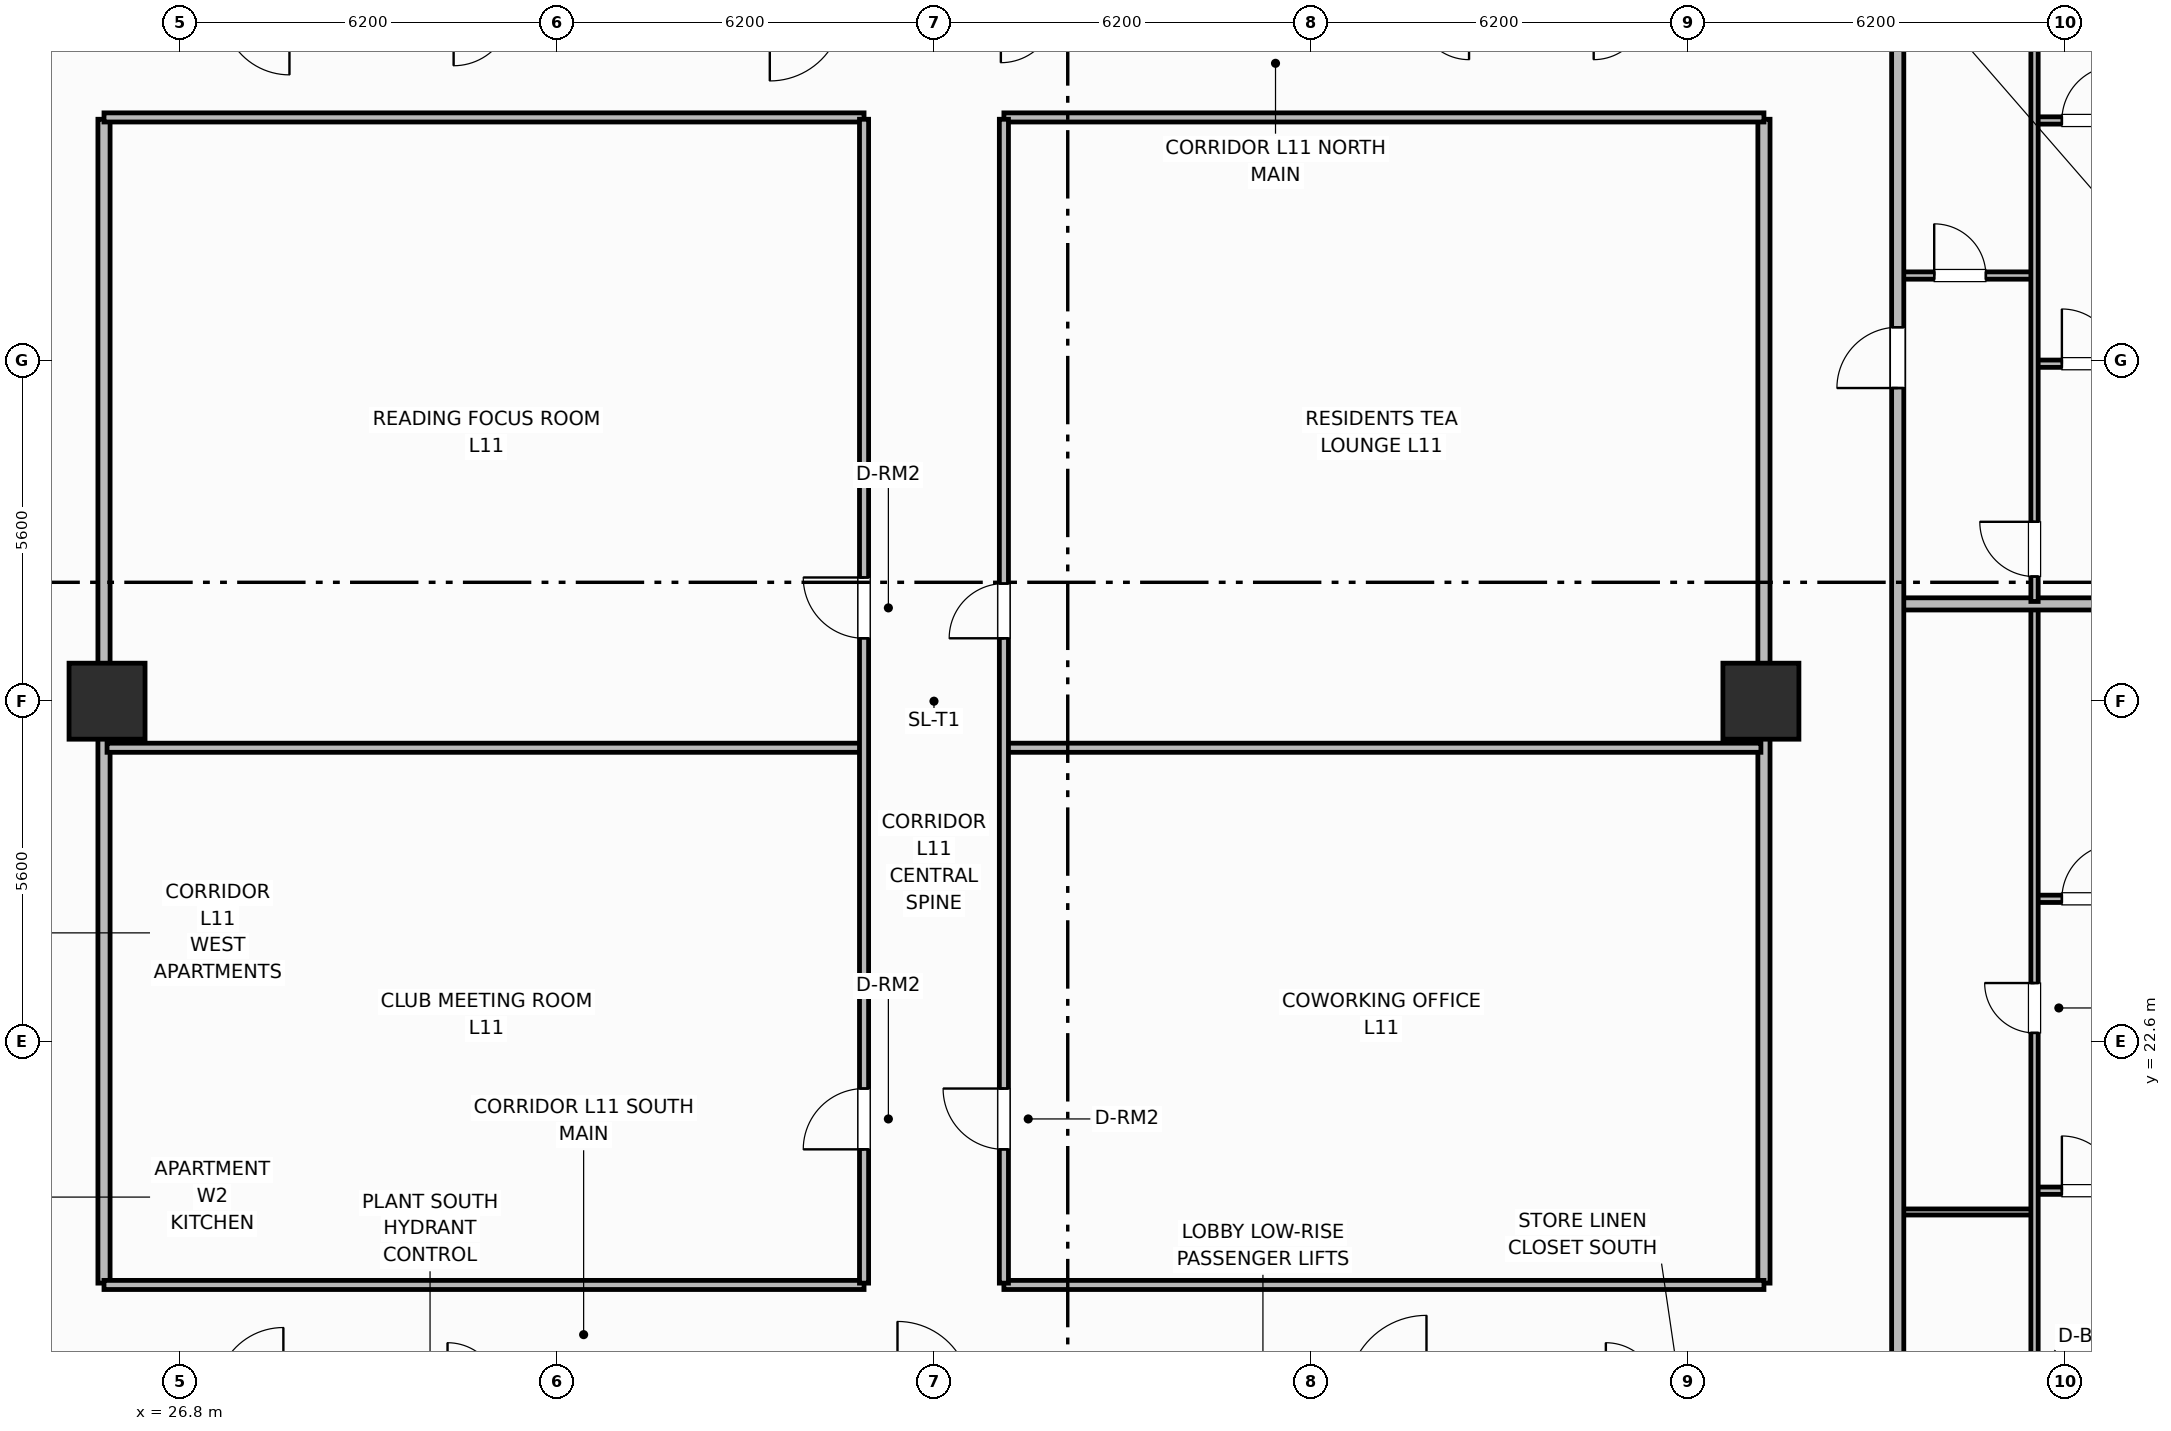
"""IFC4 building model, lengths in metres.
Left out: names, types, materials, properties, quantities, classifications, styles, units other than length and angle.
Written with IfcOpenShell. Run it as: python <this file> out.ifc"""

import sys

from ifc_helpers import new_model, si_unit, direction, frame, frame_2d, origin, origin_2d, place, context, subcontext, project, spatial, rectangle, extrude, element, fill, save


model = new_model("IFC4")
c1 = context("Model", 3, precision=1e-05, world=origin(), true_north=direction((0.0, 1.0)))
c2 = subcontext(c1, "Body", "Model", "MODEL_VIEW")
j1 = project(units=[si_unit("LENGTHUNIT", "METRE"), si_unit("PLANEANGLEUNIT", "RADIAN")], contexts=[c1])
p1 = place(None, origin())
s1 = spatial("IfcSite", under=j1, at=p1, CompositionType="ELEMENT")
p2 = place(p1, origin())
s2 = spatial("IfcBuilding", under=s1, at=p2, CompositionType="ELEMENT")
p3 = place(p2, frame((0.0, 0.0, 47.3)))
s3 = spatial("IfcBuildingStorey", under=s2, at=p3, CompositionType="ELEMENT", Elevation=47.3)
for number, where, z_axis, x_axis in (
    (1, (25.6, 28.2, 0.0), (0.0, 0.0, 1.0), (1.0, 0.0, 0.0)),
    (2, (52.8, 28.2, 0.0), (0.0, 0.0, 1.0), (1.0, 0.0, 0.0)),
):
    element("IfcColumn", number, at=place(p3, frame(where, z_axis=z_axis, x_axis=x_axis)), inside=s3, PredefinedType="COLUMN", context=c2, shape_type="SweptSolid", body=[
        extrude(rectangle(XDim=1.25, YDim=1.25, at=origin_2d()), origin(), (0.0, 0.0, 1.0), 3.7),
    ])
for number, where, z_axis, x_axis in (
    (3, (25.55, 18.63, 0.0), (0.0, 0.0, 1.0), (0.0, 1.0, 0.0)),
    (4, (52.85, 18.63, 0.0), (0.0, 0.0, 1.0), (0.0, 1.0, 0.0)),
):
    element("IfcWall", number, at=place(p3, frame(where, z_axis=z_axis, x_axis=x_axis)), inside=s3, PredefinedType="PARTITIONING", context=c2, shape_type="SweptSolid", body=[
        extrude(rectangle(XDim=19.14, YDim=0.2, at=frame_2d((9.57, 0.0))), origin(), (0.0, 0.0, 1.0), 2.53),
    ])
for number, where, z_axis, x_axis in (
    (5, (25.55, 18.6, 0.0), (0.0, 0.0, 1.0), (1.0, 0.0, 0.0)),
    (6, (40.35, 18.6, 0.0), (0.0, 0.0, 1.0), (1.0, 0.0, 0.0)),
    (7, (25.55, 37.8, 0.0), (0.0, 0.0, 1.0), (1.0, 0.0, 0.0)),
    (8, (40.35, 37.8, 0.0), (0.0, 0.0, 1.0), (1.0, 0.0, 0.0)),
):
    element("IfcWall", number, at=place(p3, frame(where, z_axis=z_axis, x_axis=x_axis)), inside=s3, PredefinedType="PARTITIONING", context=c2, shape_type="SweptSolid", body=[
        extrude(rectangle(XDim=12.5, YDim=0.15, at=frame_2d((6.25, 0.0))), origin(), (0.0, 0.0, 1.0), 2.53),
    ])
p4 = place(p3, frame((25.6, 27.434, 0.0), z_axis=(0.0, 0.0, 1.0), x_axis=(1.0, 0.0, 0.0)))
e9 = element("IfcWall", 9, at=p4, inside=s3, PredefinedType="PARTITIONING", context=c2, shape_type="SweptSolid", body=[
    extrude(rectangle(XDim=12.47, YDim=0.15, at=frame_2d((6.235, 0.0))), origin(), (0.0, 0.0, 1.0), 2.53),
])
p5 = place(p3, frame((40.38, 27.434, 0.0), z_axis=(0.0, 0.0, 1.0), x_axis=(1.0, 0.0, 0.0)))
e10 = element("IfcWall", 10, at=p5, inside=s3, PredefinedType="PARTITIONING", context=c2, shape_type="SweptSolid", body=[
    extrude(rectangle(XDim=12.42, YDim=0.15, at=frame_2d((6.21, 0.0))), origin(), (0.0, 0.0, 1.0), 2.53),
])
p6 = place(p3, frame((38.05, 18.63, 0.0), z_axis=(0.0, 0.0, 1.0), x_axis=(0.0, 1.0, 0.0)))
e11 = element("IfcWall", 11, at=p6, inside=s3, PredefinedType="PARTITIONING", context=c2, shape_type="SweptSolid", body=[
    extrude(rectangle(XDim=19.14, YDim=0.15, at=frame_2d((9.57, 0.0))), origin(), (0.0, 0.0, 1.0), 2.53),
])
p7 = place(p6, frame((2.2, 0.0, 0.0)))
e12 = element("IfcOpeningElement", 12, at=p7, cuts=e11, PredefinedType="OPENING", context=c2, shape_type="SweptSolid", body=[
    extrude(rectangle(XDim=1.0, YDim=2.15, at=frame_2d((0.5, 1.075))), frame((0.0, 0.085, 0.0), z_axis=(0.0, -1.0, 0.0), x_axis=(1.0, 0.0, 0.0)), (0.0, 0.0, 1.0), 0.17),
])
p8 = place(p6, frame((10.604, 0.0, 0.0)))
e13 = element("IfcOpeningElement", 13, at=p8, cuts=e11, PredefinedType="OPENING", context=c2, shape_type="SweptSolid", body=[
    extrude(rectangle(XDim=1.0, YDim=2.15, at=frame_2d((0.5, 1.075))), frame((0.0, 0.085, 0.0), z_axis=(0.0, -1.0, 0.0), x_axis=(1.0, 0.0, 0.0)), (0.0, 0.0, 1.0), 0.17),
])
p9 = place(p3, frame((40.35, 18.63, 0.0), z_axis=(0.0, 0.0, 1.0), x_axis=(0.0, 1.0, 0.0)))
e14 = element("IfcWall", 14, at=p9, inside=s3, PredefinedType="PARTITIONING", context=c2, shape_type="SweptSolid", body=[
    extrude(rectangle(XDim=19.14, YDim=0.15, at=frame_2d((9.57, 0.0))), origin(), (0.0, 0.0, 1.0), 2.53),
])
p10 = place(p9, frame((2.2, 0.0, 0.0)))
e15 = element("IfcOpeningElement", 15, at=p10, cuts=e14, PredefinedType="OPENING", context=c2, shape_type="SweptSolid", body=[
    extrude(rectangle(XDim=1.0, YDim=2.15, at=frame_2d((0.5, 1.075))), frame((0.0, 0.085, 0.0), z_axis=(0.0, -1.0, 0.0), x_axis=(1.0, 0.0, 0.0)), (0.0, 0.0, 1.0), 0.17),
])
p11 = place(p9, frame((10.604, 0.0, 0.0)))
e16 = element("IfcOpeningElement", 16, at=p11, cuts=e14, PredefinedType="OPENING", context=c2, shape_type="SweptSolid", body=[
    extrude(rectangle(XDim=0.9, YDim=2.1, at=frame_2d((0.45, 1.05))), frame((0.0, 0.085, 0.0), z_axis=(0.0, -1.0, 0.0), x_axis=(1.0, 0.0, 0.0)), (0.0, 0.0, 1.0), 0.17),
])
p12 = place(p3, frame((55.05, 19.8, 0.0), z_axis=(0.0, 0.0, 1.0), x_axis=(1.0, 0.0, 0.0)))
e17 = element("IfcWall", 17, at=p12, inside=s3, PredefinedType="PARTITIONING", context=c2, shape_type="SweptSolid", body=[
    extrude(rectangle(XDim=2.25, YDim=0.1, at=frame_2d((1.125, 0.0))), origin(), (0.0, 0.0, 1.0), 2.53),
])
p13 = place(p3, frame((57.3, 20.15, 0.0), z_axis=(0.0, 0.0, 1.0), x_axis=(1.0, 0.0, 0.0)))
e18 = element("IfcWall", 18, at=p13, inside=s3, PredefinedType="PARTITIONING", context=c2, shape_type="SweptSolid", body=[
    extrude(rectangle(XDim=6.53, YDim=0.12, at=frame_2d((3.265, 0.0))), origin(), (0.0, 0.0, 1.0), 2.53),
])
p14 = place(p13, frame((0.45, 0.0, 0.0)))
e19 = element("IfcOpeningElement", 19, at=p14, cuts=e18, PredefinedType="OPENING", context=c2, shape_type="SweptSolid", body=[
    extrude(rectangle(XDim=0.9, YDim=2.1, at=frame_2d((0.45, 1.05))), frame((0.0, 0.07, 0.0), z_axis=(0.0, -1.0, 0.0), x_axis=(1.0, 0.0, 0.0)), (0.0, 0.0, 1.0), 0.14),
])
p15 = place(p3, frame((57.3, 24.95, 0.0), z_axis=(0.0, 0.0, 1.0), x_axis=(1.0, 0.0, 0.0)))
e20 = element("IfcWall", 20, at=p15, inside=s3, PredefinedType="PARTITIONING", context=c2, shape_type="SweptSolid", body=[
    extrude(rectangle(XDim=5.876, YDim=0.12, at=frame_2d((2.938, 0.0))), origin(), (0.0, 0.0, 1.0), 2.53),
])
p16 = place(p15, frame((0.45, 0.0, 0.0)))
e21 = element("IfcOpeningElement", 21, at=p16, cuts=e20, PredefinedType="OPENING", context=c2, shape_type="SweptSolid", body=[
    extrude(rectangle(XDim=0.9, YDim=2.1, at=frame_2d((0.45, 1.05))), frame((0.0, 0.07, 0.0), z_axis=(0.0, -1.0, 0.0), x_axis=(1.0, 0.0, 0.0)), (0.0, 0.0, 1.0), 0.14),
])
p17 = place(p3, frame((57.3, 10.64, 0.0), z_axis=(0.0, 0.0, 1.0), x_axis=(0.0, 1.0, 0.0)))
e22 = element("IfcWall", 22, at=p17, inside=s3, PredefinedType="PARTITIONING", context=c2, shape_type="SweptSolid", body=[
    extrude(rectangle(XDim=19.12, YDim=0.12, at=frame_2d((9.56, 0.0))), origin(), (0.0, 0.0, 1.0), 2.53),
])
p18 = place(p17, frame((0.41, 0.0, 0.0)))
e23 = element("IfcOpeningElement", 23, at=p18, cuts=e22, PredefinedType="OPENING", context=c2, shape_type="SweptSolid", body=[
    extrude(rectangle(XDim=0.9, YDim=2.1, at=frame_2d((0.45, 1.05))), frame((0.0, 0.07, 0.0), z_axis=(0.0, -1.0, 0.0), x_axis=(1.0, 0.0, 0.0)), (0.0, 0.0, 1.0), 0.14),
])
p19 = place(p17, frame((12.105, 0.0, 0.0)))
e24 = element("IfcOpeningElement", 24, at=p19, cuts=e22, PredefinedType="OPENING", context=c2, shape_type="SweptSolid", body=[
    extrude(rectangle(XDim=0.82, YDim=2.08, at=frame_2d((0.41, 1.04))), frame((0.0, 0.07, 0.0), z_axis=(0.0, -1.0, 0.0), x_axis=(1.0, 0.0, 0.0)), (0.0, 0.0, 1.0), 0.14),
])
p20 = place(p3, frame((55.05, 29.8, 0.0), z_axis=(0.0, 0.0, 1.0), x_axis=(1.0, 0.0, 0.0)))
e25 = element("IfcWall", 25, at=p20, inside=s3, PredefinedType="PARTITIONING", context=c2, shape_type="SweptSolid", body=[
    extrude(rectangle(XDim=8.066, YDim=0.2, at=frame_2d((4.033, 0.0))), origin(), (0.0, 0.0, 1.0), 2.53),
])
p21 = place(p3, frame((55.05, 35.2, 0.0), z_axis=(0.0, 0.0, 1.0), x_axis=(1.0, 0.0, 0.0)))
e26 = element("IfcWall", 26, at=p21, inside=s3, PredefinedType="PARTITIONING", context=c2, shape_type="SweptSolid", body=[
    extrude(rectangle(XDim=2.25, YDim=0.12, at=frame_2d((1.125, 0.0))), origin(), (0.0, 0.0, 1.0), 2.53),
])
p22 = place(p21, frame((0.6, 0.0, 0.0)))
e27 = element("IfcOpeningElement", 27, at=p22, cuts=e26, PredefinedType="OPENING", context=c2, shape_type="SweptSolid", body=[
    extrude(rectangle(XDim=0.85, YDim=2.1, at=frame_2d((0.425, 1.05))), frame((0.0, 0.07, 0.0), z_axis=(0.0, -1.0, 0.0), x_axis=(1.0, 0.0, 0.0)), (0.0, 0.0, 1.0), 0.14),
])
p23 = place(p3, frame((57.3, 33.75, 0.0), z_axis=(0.0, 0.0, 1.0), x_axis=(1.0, 0.0, 0.0)))
e28 = element("IfcWall", 28, at=p23, inside=s3, PredefinedType="PARTITIONING", context=c2, shape_type="SweptSolid", body=[
    extrude(rectangle(XDim=6.53, YDim=0.12, at=frame_2d((3.265, 0.0))), origin(), (0.0, 0.0, 1.0), 2.53),
])
p24 = place(p23, frame((0.45, 0.0, 0.0)))
e29 = element("IfcOpeningElement", 29, at=p24, cuts=e28, PredefinedType="OPENING", context=c2, shape_type="SweptSolid", body=[
    extrude(rectangle(XDim=0.9, YDim=2.1, at=frame_2d((0.45, 1.05))), frame((0.0, 0.07, 0.0), z_axis=(0.0, -1.0, 0.0), x_axis=(1.0, 0.0, 0.0)), (0.0, 0.0, 1.0), 0.14),
])
p25 = place(p3, frame((57.3, 37.75, 0.0), z_axis=(0.0, 0.0, 1.0), x_axis=(1.0, 0.0, 0.0)))
e30 = element("IfcWall", 30, at=p25, inside=s3, PredefinedType="PARTITIONING", context=c2, shape_type="SweptSolid", body=[
    extrude(rectangle(XDim=6.53, YDim=0.12, at=frame_2d((3.265, 0.0))), origin(), (0.0, 0.0, 1.0), 2.53),
])
p26 = place(p25, frame((0.45, 0.0, 0.0)))
e31 = element("IfcOpeningElement", 31, at=p26, cuts=e30, PredefinedType="OPENING", context=c2, shape_type="SweptSolid", body=[
    extrude(rectangle(XDim=0.9, YDim=2.1, at=frame_2d((0.45, 1.05))), frame((0.0, 0.07, 0.0), z_axis=(0.0, -1.0, 0.0), x_axis=(1.0, 0.0, 0.0)), (0.0, 0.0, 1.0), 0.14),
])
p27 = place(p3, frame((57.3, 29.84, 0.0), z_axis=(0.0, 0.0, 1.0), x_axis=(0.0, 1.0, 0.0)))
e32 = element("IfcWall", 32, at=p27, inside=s3, PredefinedType="PARTITIONING", context=c2, shape_type="SweptSolid", body=[
    extrude(rectangle(XDim=15.92, YDim=0.12, at=frame_2d((7.96, 0.0))), origin(), (0.0, 0.0, 1.0), 2.53),
])
p28 = place(p27, frame((0.41, 0.0, 0.0)))
e33 = element("IfcOpeningElement", 33, at=p28, cuts=e32, PredefinedType="OPENING", context=c2, shape_type="SweptSolid", body=[
    extrude(rectangle(XDim=0.9, YDim=2.1, at=frame_2d((0.45, 1.05))), frame((0.0, 0.07, 0.0), z_axis=(0.0, -1.0, 0.0), x_axis=(1.0, 0.0, 0.0)), (0.0, 0.0, 1.0), 0.14),
])
p29 = place(p27, frame((13.125, 0.0, 0.0)))
e34 = element("IfcOpeningElement", 34, at=p29, cuts=e32, PredefinedType="OPENING", context=c2, shape_type="SweptSolid", body=[
    extrude(rectangle(XDim=0.82, YDim=2.08, at=frame_2d((0.41, 1.04))), frame((0.0, 0.07, 0.0), z_axis=(0.0, -1.0, 0.0), x_axis=(1.0, 0.0, 0.0)), (0.0, 0.0, 1.0), 0.14),
])
p30 = place(p3, frame((55.05, 10.6, 0.0), z_axis=(0.0, 0.0, 1.0), x_axis=(0.0, 1.0, 0.0)))
e35 = element("IfcWall", 35, at=p30, inside=s3, PredefinedType="PARTITIONING", context=c2, shape_type="SweptSolid", body=[
    extrude(rectangle(XDim=35.2, YDim=0.2, at=frame_2d((17.6, 0.0))), origin(), (0.0, 0.0, 1.0), 2.53),
])
p31 = place(p30, frame((2.65, 0.0, 0.0)))
e36 = element("IfcOpeningElement", 36, at=p31, cuts=e35, PredefinedType="OPENING", context=c2, shape_type="SweptSolid", body=[
    extrude(rectangle(XDim=1.0, YDim=2.15, at=frame_2d((0.5, 1.075))), frame((0.0, 0.11, 0.0), z_axis=(0.0, -1.0, 0.0), x_axis=(1.0, 0.0, 0.0)), (0.0, 0.0, 1.0), 0.22),
])
p32 = place(p30, frame((22.75, 0.0, 0.0)))
e37 = element("IfcOpeningElement", 37, at=p32, cuts=e35, PredefinedType="OPENING", context=c2, shape_type="SweptSolid", body=[
    extrude(rectangle(XDim=1.0, YDim=2.15, at=frame_2d((0.5, 1.075))), frame((0.0, 0.11, 0.0), z_axis=(0.0, -1.0, 0.0), x_axis=(1.0, 0.0, 0.0)), (0.0, 0.0, 1.0), 0.22),
])
p33 = place(p7, origin())
e38 = element("IfcDoor", 38, at=p33, inside=s3, OperationType="SINGLE_SWING_LEFT", PredefinedType="DOOR", context=c2, shape_type="SweptSolid", body=[
    extrude(rectangle(XDim=1.0, YDim=2.15, at=frame_2d((0.5, 1.075))), frame((0.0, 0.025, 0.0), z_axis=(0.0, -1.0, 0.0), x_axis=(1.0, 0.0, 0.0)), (0.0, 0.0, 1.0), 0.05),
])
fill(e12, e38)
p34 = place(p8, origin())
e39 = element("IfcDoor", 39, at=p34, inside=s3, OperationType="SINGLE_SWING_RIGHT", PredefinedType="DOOR", context=c2, shape_type="SweptSolid", body=[
    extrude(rectangle(XDim=1.0, YDim=2.15, at=frame_2d((0.5, 1.075))), frame((0.0, 0.025, 0.0), z_axis=(0.0, -1.0, 0.0), x_axis=(1.0, 0.0, 0.0)), (0.0, 0.0, 1.0), 0.05),
])
fill(e13, e39)
p35 = place(p10, origin())
e40 = element("IfcDoor", 40, at=p35, inside=s3, OperationType="SINGLE_SWING_RIGHT", PredefinedType="DOOR", context=c2, shape_type="SweptSolid", body=[
    extrude(rectangle(XDim=1.0, YDim=2.15, at=frame_2d((0.5, 1.075))), frame((0.0, 0.025, 0.0), z_axis=(0.0, -1.0, 0.0), x_axis=(1.0, 0.0, 0.0)), (0.0, 0.0, 1.0), 0.05),
])
fill(e15, e40)
p36 = place(p11, origin())
e41 = element("IfcDoor", 41, at=p36, inside=s3, OperationType="SINGLE_SWING_LEFT", PredefinedType="DOOR", context=c2, shape_type="SweptSolid", body=[
    extrude(rectangle(XDim=0.9, YDim=2.1, at=frame_2d((0.45, 1.05))), frame((0.0, 0.025, 0.0), z_axis=(0.0, -1.0, 0.0), x_axis=(1.0, 0.0, 0.0)), (0.0, 0.0, 1.0), 0.05),
])
fill(e16, e41)
p37 = place(p14, origin())
e42 = element("IfcDoor", 42, at=p37, inside=s3, OperationType="SINGLE_SWING_LEFT", PredefinedType="DOOR", context=c2, shape_type="SweptSolid", body=[
    extrude(rectangle(XDim=0.9, YDim=2.1, at=frame_2d((0.45, 1.05))), frame((0.0, 0.025, 0.0), z_axis=(0.0, -1.0, 0.0), x_axis=(1.0, 0.0, 0.0)), (0.0, 0.0, 1.0), 0.05),
])
fill(e19, e42)
p38 = place(p16, origin())
e43 = element("IfcDoor", 43, at=p38, inside=s3, OperationType="SINGLE_SWING_RIGHT", PredefinedType="DOOR", context=c2, shape_type="SweptSolid", body=[
    extrude(rectangle(XDim=0.9, YDim=2.1, at=frame_2d((0.45, 1.05))), frame((0.0, 0.025, 0.0), z_axis=(0.0, -1.0, 0.0), x_axis=(1.0, 0.0, 0.0)), (0.0, 0.0, 1.0), 0.05),
])
fill(e21, e43)
p39 = place(p19, origin())
e44 = element("IfcDoor", 44, at=p39, inside=s3, OperationType="SINGLE_SWING_RIGHT", PredefinedType="DOOR", context=c2, shape_type="SweptSolid", body=[
    extrude(rectangle(XDim=0.82, YDim=2.08, at=frame_2d((0.41, 1.04))), frame((0.0, 0.025, 0.0), z_axis=(0.0, -1.0, 0.0), x_axis=(1.0, 0.0, 0.0)), (0.0, 0.0, 1.0), 0.05),
])
fill(e24, e44)
p40 = place(p22, origin())
e45 = element("IfcDoor", 45, at=p40, inside=s3, OperationType="SINGLE_SWING_LEFT", PredefinedType="DOOR", context=c2, shape_type="SweptSolid", body=[
    extrude(rectangle(XDim=0.85, YDim=2.1, at=frame_2d((0.425, 1.05))), frame((0.0, 0.025, 0.0), z_axis=(0.0, -1.0, 0.0), x_axis=(1.0, 0.0, 0.0)), (0.0, 0.0, 1.0), 0.05),
])
fill(e27, e45)
p41 = place(p24, origin())
e46 = element("IfcDoor", 46, at=p41, inside=s3, OperationType="SINGLE_SWING_LEFT", PredefinedType="DOOR", context=c2, shape_type="SweptSolid", body=[
    extrude(rectangle(XDim=0.9, YDim=2.1, at=frame_2d((0.45, 1.05))), frame((0.0, 0.025, 0.0), z_axis=(0.0, -1.0, 0.0), x_axis=(1.0, 0.0, 0.0)), (0.0, 0.0, 1.0), 0.05),
])
fill(e29, e46)
p42 = place(p26, origin())
e47 = element("IfcDoor", 47, at=p42, inside=s3, OperationType="SINGLE_SWING_RIGHT", PredefinedType="DOOR", context=c2, shape_type="SweptSolid", body=[
    extrude(rectangle(XDim=0.9, YDim=2.1, at=frame_2d((0.45, 1.05))), frame((0.0, 0.025, 0.0), z_axis=(0.0, -1.0, 0.0), x_axis=(1.0, 0.0, 0.0)), (0.0, 0.0, 1.0), 0.05),
])
fill(e31, e47)
p43 = place(p28, origin())
e48 = element("IfcDoor", 48, at=p43, inside=s3, OperationType="SINGLE_SWING_RIGHT", PredefinedType="DOOR", context=c2, shape_type="SweptSolid", body=[
    extrude(rectangle(XDim=0.9, YDim=2.1, at=frame_2d((0.45, 1.05))), frame((0.0, 0.025, 0.0), z_axis=(0.0, -1.0, 0.0), x_axis=(1.0, 0.0, 0.0)), (0.0, 0.0, 1.0), 0.05),
])
fill(e33, e48)
p44 = place(p32, origin())
e49 = element("IfcDoor", 49, at=p44, inside=s3, OperationType="SINGLE_SWING_LEFT", PredefinedType="DOOR", context=c2, shape_type="SweptSolid", body=[
    extrude(rectangle(XDim=1.0, YDim=2.15, at=frame_2d((0.5, 1.075))), frame((0.0, 0.025, 0.0), z_axis=(0.0, -1.0, 0.0), x_axis=(1.0, 0.0, 0.0)), (0.0, 0.0, 1.0), 0.05),
])
fill(e37, e49)
save(model, sys.argv[1])
